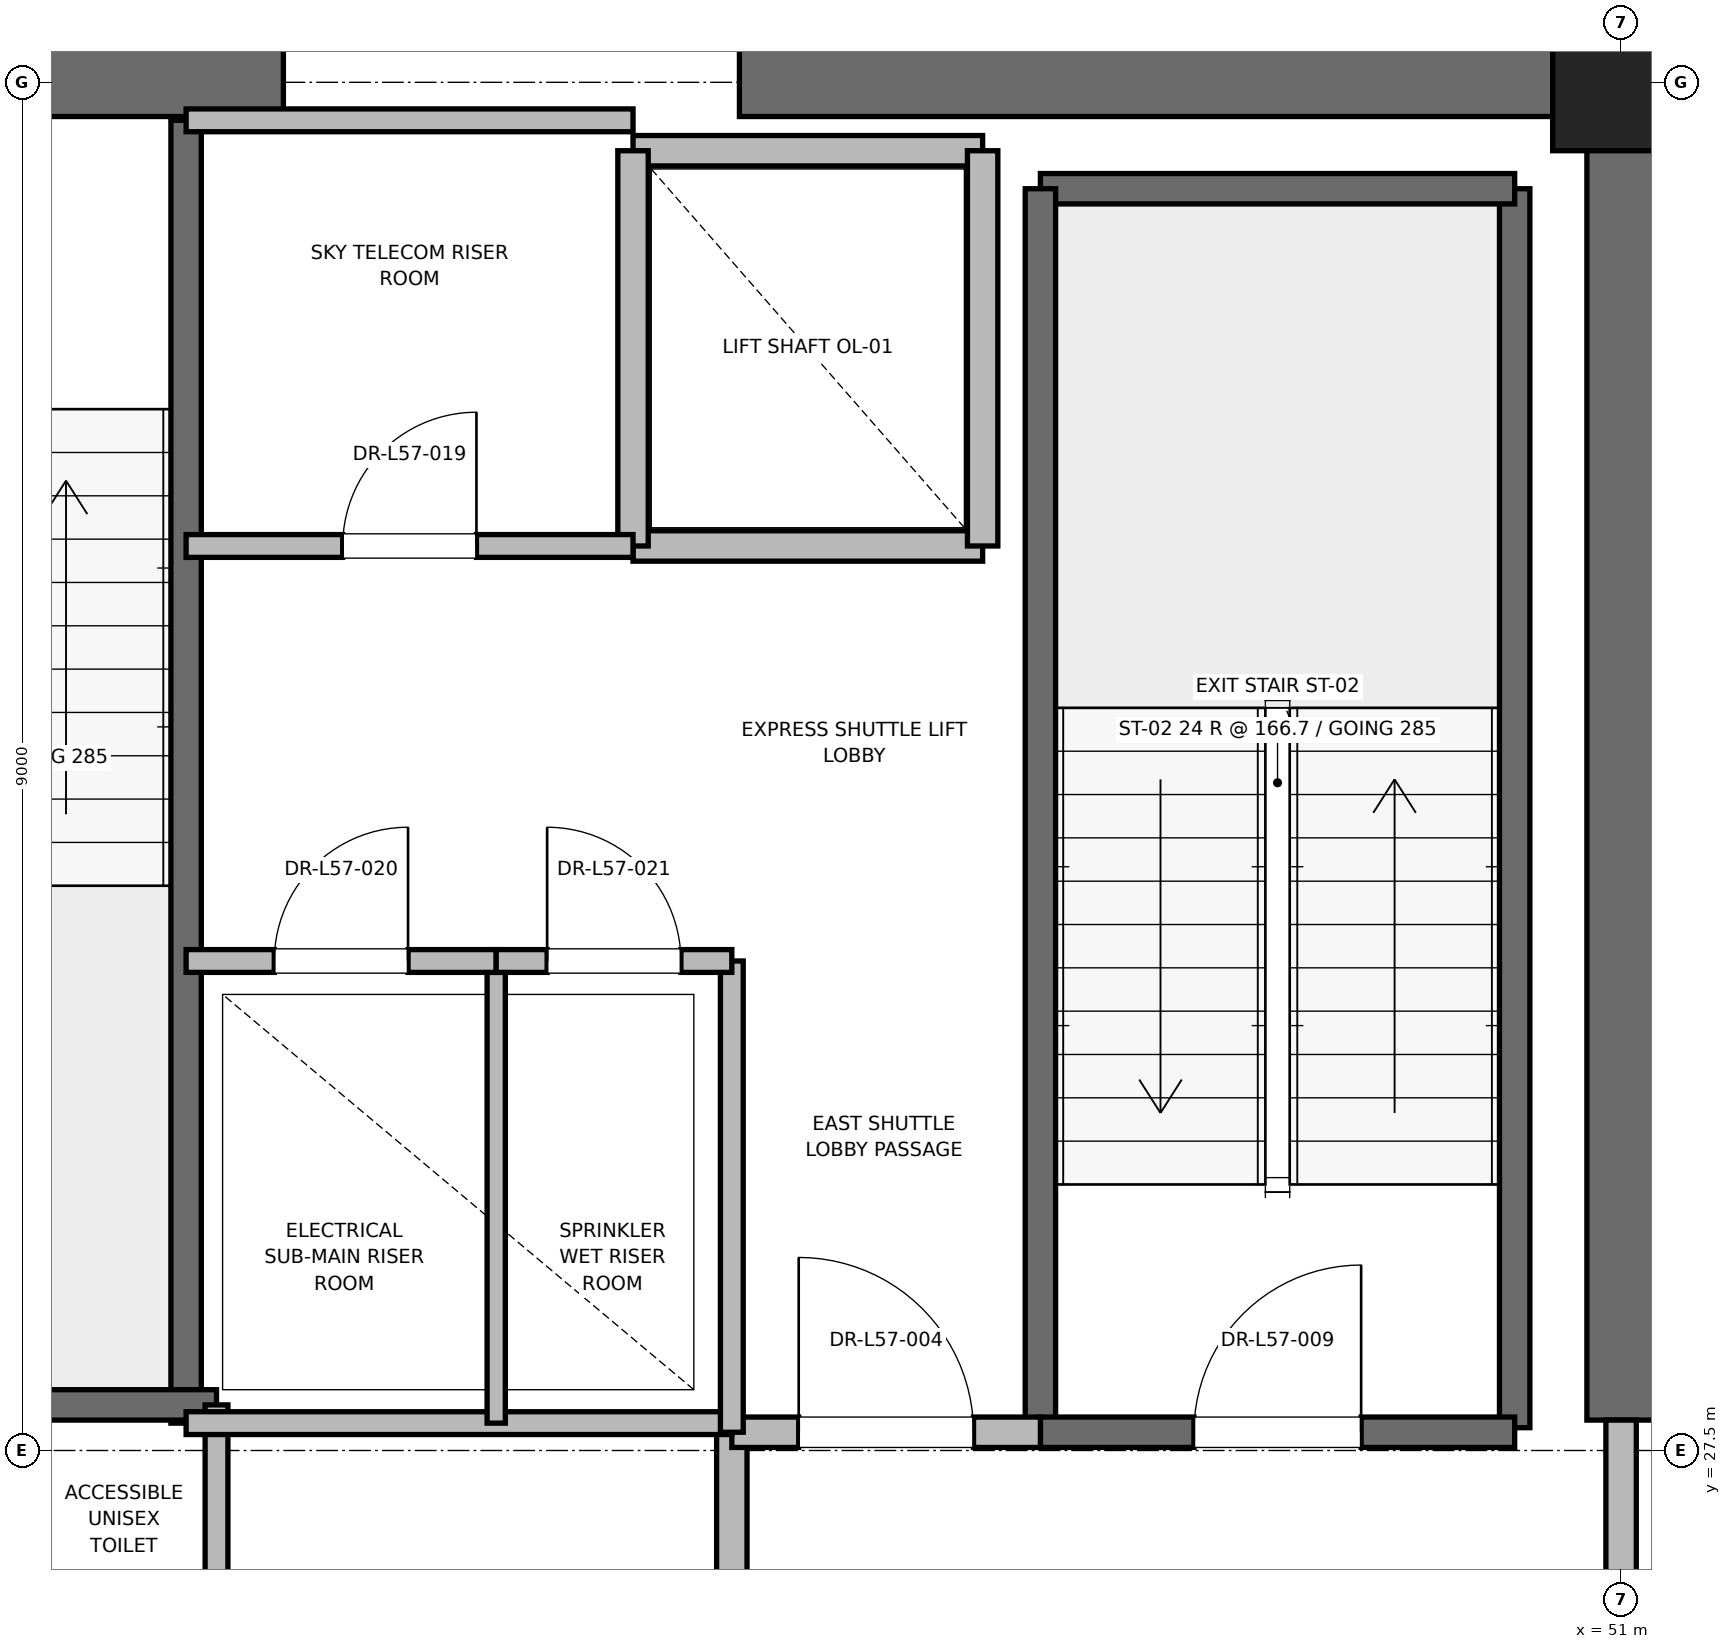
"""IFC4 building model, lengths in metres.
Left out: names, types, materials, properties, quantities, classifications, styles, units other than length and angle.
Written with IfcOpenShell. Run it as: python <this file> out.ifc"""

import sys

from ifc_helpers import new_model, si_unit, direction, frame, frame_2d, origin, origin_2d, place, context, subcontext, project, spatial, rectangle, extrude, element, fill, save


model = new_model("IFC4")
c1 = context("Model", 3, precision=1e-05, world=origin(), true_north=direction((0.0, 1.0)))
c2 = subcontext(c1, "Body", "Model", "MODEL_VIEW")
j1 = project(units=[si_unit("LENGTHUNIT", "METRE"), si_unit("PLANEANGLEUNIT", "RADIAN")], contexts=[c1])
p1 = place(None, origin())
s1 = spatial("IfcSite", under=j1, at=p1, CompositionType="ELEMENT")
p2 = place(p1, origin())
s2 = spatial("IfcBuilding", under=s1, at=p2, CompositionType="ELEMENT")
p3 = place(p2, frame((0.0, 0.0, 247.2)))
s3 = spatial("IfcBuildingStorey", under=s2, at=p3, CompositionType="ELEMENT", Elevation=247.2)
p4 = place(p3, frame((51.0, 36.5, 0.0), z_axis=(0.0, 0.0, 1.0), x_axis=(1.0, 0.0, 0.0)))
e1 = element("IfcColumn", 1, at=p4, inside=s3, PredefinedType="PILASTER", context=c2, shape_type="SweptSolid", body=[
    extrude(rectangle(XDim=0.9, YDim=0.9, at=origin_2d()), origin(), (0.0, 0.0, 1.0), 4.0),
])
p5 = place(p3, frame((37.8, 36.5, 0.0), z_axis=(0.0, 0.0, 1.0), x_axis=(1.0, 0.0, 0.0)))
e2 = element("IfcWall", 2, at=p5, inside=s3, PredefinedType="SHEAR", context=c2, shape_type="SweptSolid", body=[
    extrude(rectangle(XDim=4.4, YDim=0.45, at=frame_2d((2.2, 0.0))), origin(), (0.0, 0.0, 1.0), 3.785),
])
p6 = place(p5, frame((1.65, 0.0, 0.0)))
e3 = element("IfcOpeningElement", 3, at=p6, cuts=e2, PredefinedType="OPENING", context=c2, shape_type="SweptSolid", body=[
    extrude(rectangle(XDim=1.1, YDim=2.15, at=frame_2d((0.55, 1.075))), frame((0.0, 0.225, 0.0), z_axis=(0.0, -1.0, 0.0), x_axis=(1.0, 0.0, 0.0)), (0.0, 0.0, 1.0), 0.45),
])
p7 = place(p3, frame((45.2, 36.5, 0.0), z_axis=(0.0, 0.0, 1.0), x_axis=(1.0, 0.0, 0.0)))
e4 = element("IfcWall", 4, at=p7, inside=s3, PredefinedType="SHEAR", context=c2, shape_type="SweptSolid", body=[
    extrude(rectangle(XDim=5.8, YDim=0.45, at=frame_2d((2.9, 0.0))), origin(), (0.0, 0.0, 1.0), 3.785),
])
p8 = place(p3, frame((51.0, 27.7, 0.0), z_axis=(0.0, 0.0, 1.0), x_axis=(0.0, 1.0, 0.0)))
e5 = element("IfcWall", 5, at=p8, inside=s3, PredefinedType="SHEAR", context=c2, shape_type="SweptSolid", body=[
    extrude(rectangle(XDim=8.8, YDim=0.45, at=frame_2d((4.4, 0.0))), origin(), (0.0, 0.0, 1.0), 3.785),
])
p9 = place(p3, frame((50.3, 27.65, 0.0), z_axis=(0.0, 0.0, 1.0), x_axis=(0.0, 1.0, 0.0)))
e6 = element("IfcWall", 6, at=p9, inside=s3, PredefinedType="SOLIDWALL", context=c2, shape_type="SweptSolid", body=[
    extrude(rectangle(XDim=8.15, YDim=0.2, at=frame_2d((4.075, 0.0))), origin(), (0.0, 0.0, 1.0), 3.785),
])
p10 = place(p3, frame((47.18, 35.8, 0.0), z_axis=(0.0, 0.0, 1.0), x_axis=(1.0, 0.0, 0.0)))
e7 = element("IfcWall", 7, at=p10, inside=s3, PredefinedType="SOLIDWALL", context=c2, shape_type="SweptSolid", body=[
    extrude(rectangle(XDim=3.12, YDim=0.2, at=frame_2d((1.56, 0.0))), origin(), (0.0, 0.0, 1.0), 3.785),
])
p11 = place(p3, frame((47.18, 27.62, 0.0), z_axis=(0.0, 0.0, 1.0), x_axis=(0.0, 1.0, 0.0)))
e8 = element("IfcWall", 8, at=p11, inside=s3, PredefinedType="SOLIDWALL", context=c2, shape_type="SweptSolid", body=[
    extrude(rectangle(XDim=8.18, YDim=0.2, at=frame_2d((4.09, 0.0))), origin(), (0.0, 0.0, 1.0), 3.785),
])
p12 = place(p3, frame((47.18, 27.62, 0.0), z_axis=(0.0, 0.0, 1.0), x_axis=(1.0, 0.0, 0.0)))
e9 = element("IfcWall", 9, at=p12, inside=s3, PredefinedType="SOLIDWALL", context=c2, shape_type="SweptSolid", body=[
    extrude(rectangle(XDim=3.12, YDim=0.2, at=frame_2d((1.56, 0.0))), origin(), (0.0, 0.0, 1.0), 3.785),
])
p13 = place(p12, frame((1.01, 0.0, 0.0)))
e10 = element("IfcOpeningElement", 10, at=p13, cuts=e9, PredefinedType="OPENING", context=c2, shape_type="SweptSolid", body=[
    extrude(rectangle(XDim=1.1, YDim=2.15, at=frame_2d((0.55, 1.075))), frame((0.0, 0.1, 0.0), z_axis=(0.0, -1.0, 0.0), x_axis=(1.0, 0.0, 0.0)), (0.0, 0.0, 1.0), 0.2),
])
p14 = place(p3, frame((41.56, 27.68, 0.0), z_axis=(0.0, 0.0, 1.0), x_axis=(0.0, 1.0, 0.0)))
e11 = element("IfcWall", 11, at=p14, inside=s3, PredefinedType="SOLIDWALL", context=c2, shape_type="SweptSolid", body=[
    extrude(rectangle(XDim=8.57, YDim=0.2, at=frame_2d((4.285, 0.0))), origin(), (0.0, 0.0, 1.0), 3.785),
])
p15 = place(p3, frame((38.44, 27.8, 0.0), z_axis=(0.0, 0.0, 1.0), x_axis=(1.0, 0.0, 0.0)))
e12 = element("IfcWall", 12, at=p15, inside=s3, PredefinedType="SOLIDWALL", context=c2, shape_type="SweptSolid", body=[
    extrude(rectangle(XDim=3.32, YDim=0.2, at=frame_2d((1.66, 0.0))), origin(), (0.0, 0.0, 1.0), 3.785),
])
p16 = place(p3, frame((45.15, 24.25, 0.0), z_axis=(0.0, 0.0, 1.0), x_axis=(0.0, 1.0, 0.0)))
e13 = element("IfcWall", 13, at=p16, inside=s3, PredefinedType="PARTITIONING", context=c2, shape_type="SweptSolid", body=[
    extrude(rectangle(XDim=3.37, YDim=0.2, at=frame_2d((1.685, 0.0))), origin(), (0.0, 0.0, 1.0), 3.785),
])
p17 = place(p3, frame((45.15, 27.62, 0.0), z_axis=(0.0, 0.0, 1.0), x_axis=(1.0, 0.0, 0.0)))
e14 = element("IfcWall", 14, at=p17, inside=s3, PredefinedType="PARTITIONING", context=c2, shape_type="SweptSolid", body=[
    extrude(rectangle(XDim=2.03, YDim=0.2, at=frame_2d((1.015, 0.0))), origin(), (0.0, 0.0, 1.0), 3.785),
])
p18 = place(p17, frame((0.44, 0.0, 0.0)))
e15 = element("IfcOpeningElement", 15, at=p18, cuts=e14, PredefinedType="OPENING", context=c2, shape_type="SweptSolid", body=[
    extrude(rectangle(XDim=1.15, YDim=2.2, at=frame_2d((0.575, 1.1))), frame((0.0, 0.1, 0.0), z_axis=(0.0, -1.0, 0.0), x_axis=(1.0, 0.0, 0.0)), (0.0, 0.0, 1.0), 0.2),
])
p19 = place(p3, frame((51.0, 24.3, 0.0), z_axis=(0.0, 0.0, 1.0), x_axis=(0.0, 1.0, 0.0)))
e16 = element("IfcWall", 16, at=p19, inside=s3, PredefinedType="PARTITIONING", context=c2, shape_type="SweptSolid", body=[
    extrude(rectangle(XDim=3.4, YDim=0.2, at=frame_2d((1.7, 0.0))), origin(), (0.0, 0.0, 1.0), 2.865),
])
p20 = place(p19, frame((1.125, 0.0, 0.0)))
e17 = element("IfcOpeningElement", 17, at=p20, cuts=e16, PredefinedType="OPENING", context=c2, shape_type="SweptSolid", body=[
    extrude(rectangle(XDim=1.15, YDim=2.2, at=frame_2d((0.575, 1.1))), frame((0.0, 0.1, 0.0), z_axis=(0.0, -1.0, 0.0), x_axis=(1.0, 0.0, 0.0)), (0.0, 0.0, 1.0), 0.2),
])
p21 = place(p3, frame((44.5, 33.45, 0.0), z_axis=(0.0, 0.0, 1.0), x_axis=(1.0, 0.0, 0.0)))
e18 = element("IfcWall", 18, at=p21, inside=s3, PredefinedType="SOLIDWALL", context=c2, shape_type="SweptSolid", body=[
    extrude(rectangle(XDim=2.3, YDim=0.2, at=frame_2d((1.15, 0.0))), origin(), (0.0, 0.0, 1.0), 3.785),
])
p22 = place(p3, frame((46.8, 36.05, 0.0), z_axis=(0.0, 0.0, 1.0), x_axis=(-1.0, 0.0, 0.0)))
e19 = element("IfcWall", 19, at=p22, inside=s3, PredefinedType="SOLIDWALL", context=c2, shape_type="SweptSolid", body=[
    extrude(rectangle(XDim=2.3, YDim=0.2, at=frame_2d((1.15, 0.0))), origin(), (0.0, 0.0, 1.0), 2.865),
])
p23 = place(p3, frame((44.5, 36.05, 0.0), z_axis=(0.0, 0.0, 1.0), x_axis=(0.0, -1.0, 0.0)))
e20 = element("IfcWall", 20, at=p23, inside=s3, PredefinedType="SOLIDWALL", context=c2, shape_type="SweptSolid", body=[
    extrude(rectangle(XDim=2.6, YDim=0.2, at=frame_2d((1.3, 0.0))), origin(), (0.0, 0.0, 1.0), 2.865),
])
p24 = place(p3, frame((46.8, 33.45, 0.0), z_axis=(0.0, 0.0, 1.0), x_axis=(0.0, 1.0, 0.0)))
e21 = element("IfcWall", 21, at=p24, inside=s3, PredefinedType="SOLIDWALL", context=c2, shape_type="SweptSolid", body=[
    extrude(rectangle(XDim=2.6, YDim=0.2, at=frame_2d((1.3, 0.0))), origin(), (0.0, 0.0, 1.0), 3.785),
])
p25 = place(p3, frame((41.76, 23.8, 0.0), z_axis=(0.0, 0.0, 1.0), x_axis=(0.0, 1.0, 0.0)))
e22 = element("IfcWall", 22, at=p25, inside=s3, PredefinedType="PARTITIONING", context=c2, shape_type="SweptSolid", body=[
    extrude(rectangle(XDim=4.0, YDim=0.15, at=frame_2d((2.0, 0.0))), origin(), (0.0, 0.0, 1.0), 2.85),
])
p26 = place(p3, frame((41.56, 27.68, 0.0), z_axis=(0.0, 0.0, 1.0), x_axis=(1.0, 0.0, 0.0)))
e23 = element("IfcWall", 23, at=p26, inside=s3, PredefinedType="PARTITIONING", context=c2, shape_type="SweptSolid", body=[
    extrude(rectangle(XDim=3.59, YDim=0.15, at=frame_2d((1.795, 0.0))), origin(), (0.0, 0.0, 1.0), 2.85),
])
p27 = place(p3, frame((45.15, 27.62, 0.0), z_axis=(0.0, 0.0, 1.0), x_axis=(0.0, 1.0, 0.0)))
e24 = element("IfcWall", 24, at=p27, inside=s3, PredefinedType="PARTITIONING", context=c2, shape_type="SweptSolid", body=[
    extrude(rectangle(XDim=3.1, YDim=0.15, at=frame_2d((1.55, 0.0))), origin(), (0.0, 0.0, 1.0), 2.85),
])
p28 = place(p3, frame((43.6, 27.68, 0.0), z_axis=(0.0, 0.0, 1.0), x_axis=(0.0, 1.0, 0.0)))
e25 = element("IfcWall", 25, at=p28, inside=s3, PredefinedType="PARTITIONING", context=c2, shape_type="SweptSolid", body=[
    extrude(rectangle(XDim=3.04, YDim=0.12, at=frame_2d((1.52, 0.0))), origin(), (0.0, 0.0, 1.0), 2.85),
])
p29 = place(p3, frame((41.56, 30.72, 0.0), z_axis=(0.0, 0.0, 1.0), x_axis=(1.0, 0.0, 0.0)))
e26 = element("IfcWall", 26, at=p29, inside=s3, PredefinedType="PARTITIONING", context=c2, shape_type="SweptSolid", body=[
    extrude(rectangle(XDim=2.04, YDim=0.15, at=frame_2d((1.02, 0.0))), origin(), (0.0, 0.0, 1.0), 2.85),
])
p30 = place(p29, frame((0.58, 0.0, 0.0)))
e27 = element("IfcOpeningElement", 27, at=p30, cuts=e26, PredefinedType="OPENING", context=c2, shape_type="SweptSolid", body=[
    extrude(rectangle(XDim=0.88, YDim=2.1, at=frame_2d((0.44, 1.05))), frame((0.0, 0.075, 0.0), z_axis=(0.0, -1.0, 0.0), x_axis=(1.0, 0.0, 0.0)), (0.0, 0.0, 1.0), 0.15),
])
p31 = place(p3, frame((43.6, 30.72, 0.0), z_axis=(0.0, 0.0, 1.0), x_axis=(1.0, 0.0, 0.0)))
e28 = element("IfcWall", 28, at=p31, inside=s3, PredefinedType="PARTITIONING", context=c2, shape_type="SweptSolid", body=[
    extrude(rectangle(XDim=1.55, YDim=0.15, at=frame_2d((0.775, 0.0))), origin(), (0.0, 0.0, 1.0), 2.85),
])
p32 = place(p31, frame((0.335, 0.0, 0.0)))
e29 = element("IfcOpeningElement", 29, at=p32, cuts=e28, PredefinedType="OPENING", context=c2, shape_type="SweptSolid", body=[
    extrude(rectangle(XDim=0.88, YDim=2.1, at=frame_2d((0.44, 1.05))), frame((0.0, 0.075, 0.0), z_axis=(0.0, -1.0, 0.0), x_axis=(1.0, 0.0, 0.0)), (0.0, 0.0, 1.0), 0.15),
])
p33 = place(p3, frame((41.56, 36.25, 0.0), z_axis=(0.0, 0.0, 1.0), x_axis=(1.0, 0.0, 0.0)))
e30 = element("IfcWall", 30, at=p33, inside=s3, PredefinedType="PARTITIONING", context=c2, shape_type="SweptSolid", body=[
    extrude(rectangle(XDim=2.94, YDim=0.15, at=frame_2d((1.47, 0.0))), origin(), (0.0, 0.0, 1.0), 2.85),
])
p34 = place(p3, frame((41.56, 33.45, 0.0), z_axis=(0.0, 0.0, 1.0), x_axis=(1.0, 0.0, 0.0)))
e31 = element("IfcWall", 31, at=p34, inside=s3, PredefinedType="PARTITIONING", context=c2, shape_type="SweptSolid", body=[
    extrude(rectangle(XDim=2.94, YDim=0.15, at=frame_2d((1.47, 0.0))), origin(), (0.0, 0.0, 1.0), 2.85),
])
p35 = place(p34, frame((1.03, 0.0, 0.0)))
e32 = element("IfcOpeningElement", 32, at=p35, cuts=e31, PredefinedType="OPENING", context=c2, shape_type="SweptSolid", body=[
    extrude(rectangle(XDim=0.88, YDim=2.1, at=frame_2d((0.44, 1.05))), frame((0.0, 0.075, 0.0), z_axis=(0.0, -1.0, 0.0), x_axis=(1.0, 0.0, 0.0)), (0.0, 0.0, 1.0), 0.15),
])
p36 = place(p13, origin())
e33 = element("IfcDoor", 33, at=p36, inside=s3, OperationType="SINGLE_SWING_RIGHT", PredefinedType="DOOR", context=c2, shape_type="SweptSolid", body=[
    extrude(rectangle(XDim=1.1, YDim=2.15, at=frame_2d((0.55, 1.075))), frame((0.0, 0.025, 0.0), z_axis=(0.0, -1.0, 0.0), x_axis=(1.0, 0.0, 0.0)), (0.0, 0.0, 1.0), 0.05),
])
fill(e10, e33)
p37 = place(p18, origin())
e34 = element("IfcDoor", 34, at=p37, inside=s3, OperationType="SINGLE_SWING_LEFT", PredefinedType="DOOR", context=c2, shape_type="SweptSolid", body=[
    extrude(rectangle(XDim=1.15, YDim=2.2, at=frame_2d((0.575, 1.1))), frame((0.0, 0.025, 0.0), z_axis=(0.0, -1.0, 0.0), x_axis=(1.0, 0.0, 0.0)), (0.0, 0.0, 1.0), 0.05),
])
fill(e15, e34)
p38 = place(p30, origin())
e35 = element("IfcDoor", 35, at=p38, inside=s3, OperationType="SINGLE_SWING_RIGHT", PredefinedType="DOOR", context=c2, shape_type="SweptSolid", body=[
    extrude(rectangle(XDim=0.88, YDim=2.1, at=frame_2d((0.44, 1.05))), frame((0.0, 0.025, 0.0), z_axis=(0.0, -1.0, 0.0), x_axis=(1.0, 0.0, 0.0)), (0.0, 0.0, 1.0), 0.05),
])
fill(e27, e35)
p39 = place(p32, origin())
e36 = element("IfcDoor", 36, at=p39, inside=s3, OperationType="SINGLE_SWING_LEFT", PredefinedType="DOOR", context=c2, shape_type="SweptSolid", body=[
    extrude(rectangle(XDim=0.88, YDim=2.1, at=frame_2d((0.44, 1.05))), frame((0.0, 0.025, 0.0), z_axis=(0.0, -1.0, 0.0), x_axis=(1.0, 0.0, 0.0)), (0.0, 0.0, 1.0), 0.05),
])
fill(e29, e36)
p40 = place(p35, origin())
e37 = element("IfcDoor", 37, at=p40, inside=s3, OperationType="SINGLE_SWING_RIGHT", PredefinedType="DOOR", context=c2, shape_type="SweptSolid", body=[
    extrude(rectangle(XDim=0.88, YDim=2.1, at=frame_2d((0.44, 1.05))), frame((0.0, 0.025, 0.0), z_axis=(0.0, -1.0, 0.0), x_axis=(1.0, 0.0, 0.0)), (0.0, 0.0, 1.0), 0.05),
])
fill(e32, e37)
save(model, sys.argv[1])
